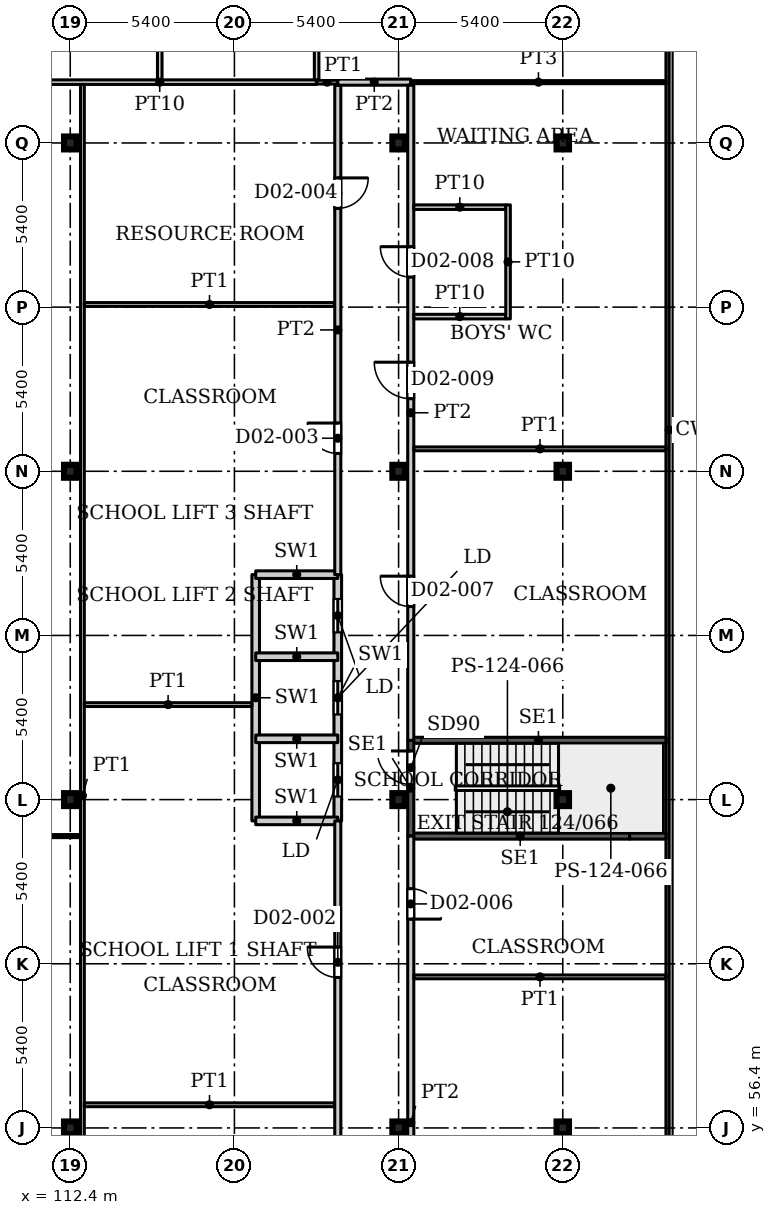
"""IFC4 building model, lengths in metres.
Left out: names, types, materials, properties, quantities, classifications, styles, units other than length and angle.
Written with IfcOpenShell. Run it as: python <this file> out.ifc"""

import sys

from ifc_helpers import new_model, si_unit, direction, frame, frame_2d, origin, origin_2d, place, context, subcontext, project, spatial, rectangle, i_section, extrude, source, transform, mapped, element, fill, save


model = new_model("IFC4")
c1 = context("Model", 3, precision=1e-05, world=origin(), true_north=direction((0.0, 1.0)))
c2 = subcontext(c1, "Body", "Model", "MODEL_VIEW")
j1 = project(units=[si_unit("LENGTHUNIT", "METRE"), si_unit("PLANEANGLEUNIT", "RADIAN")], contexts=[c1])
p1 = place(None, origin())
s1 = spatial("IfcSite", under=j1, at=p1, CompositionType="ELEMENT")
p2 = place(p1, origin())
s2 = spatial("IfcBuilding", under=s1, at=p2, CompositionType="ELEMENT")
p3 = place(p2, frame((0.0, 0.0, 12.5)))
s3 = spatial("IfcBuildingStorey", under=s2, at=p3, CompositionType="ELEMENT", Elevation=12.5)
for number, where, z_axis, x_axis in (
    (1, (112.4, 56.4, 0.0), (0.0, 0.0, 1.0), (1.0, 0.0, 0.0)),
    (2, (123.2, 56.4, 0.0), (0.0, 0.0, 1.0), (1.0, 0.0, 0.0)),
    (3, (128.6, 56.4, 0.0), (0.0, 0.0, 1.0), (1.0, 0.0, 0.0)),
    (4, (112.4, 67.2, 0.0), (0.0, 0.0, 1.0), (1.0, 0.0, 0.0)),
    (5, (123.2, 67.2, 0.0), (0.0, 0.0, 1.0), (1.0, 0.0, 0.0)),
    (6, (128.6, 67.2, 0.0), (0.0, 0.0, 1.0), (1.0, 0.0, 0.0)),
    (7, (112.4, 78.0, 0.0), (0.0, 0.0, 1.0), (1.0, 0.0, 0.0)),
    (8, (123.2, 78.0, 0.0), (0.0, 0.0, 1.0), (1.0, 0.0, 0.0)),
    (9, (128.6, 78.0, 0.0), (0.0, 0.0, 1.0), (1.0, 0.0, 0.0)),
    (10, (112.4, 88.8, 0.0), (0.0, 0.0, 1.0), (1.0, 0.0, 0.0)),
    (11, (123.2, 88.8, 0.0), (0.0, 0.0, 1.0), (1.0, 0.0, 0.0)),
    (12, (128.6, 88.8, 0.0), (0.0, 0.0, 1.0), (1.0, 0.0, 0.0)),
):
    element("IfcColumn", number, at=place(p3, frame(where, z_axis=z_axis, x_axis=x_axis)), inside=s3, PredefinedType="COLUMN", context=c2, shape_type="SweptSolid", body=[
        extrude(i_section(OverallWidth=0.409, OverallDepth=0.425, WebThickness=0.033, FlangeThickness=0.052, FilletRadius=0.013, at=origin_2d()), origin(), (0.0, 0.0, 1.0), 4.5),
    ])
p4 = place(p3, frame((118.5, 66.5, 0.0), z_axis=(0.0, 0.0, 1.0), x_axis=(0.0, 1.0, 0.0)))
e13 = element("IfcWall", 13, at=p4, inside=s3, PredefinedType="PARTITIONING", context=c2, shape_type="SweptSolid", body=[
    extrude(rectangle(XDim=8.1, YDim=0.25, at=frame_2d((4.05, 0.0))), origin(), (0.0, 0.0, 1.0), 4.5),
])
p5 = place(p3, frame((121.2, 66.5, 0.0), z_axis=(0.0, 0.0, 1.0), x_axis=(0.0, 1.0, 0.0)))
e14 = element("IfcWall", 14, at=p5, inside=s3, PredefinedType="PARTITIONING", context=c2, shape_type="SweptSolid", body=[
    extrude(rectangle(XDim=8.1, YDim=0.25, at=frame_2d((4.05, 0.0))), origin(), (0.0, 0.0, 1.0), 4.5),
])
p6 = place(p5, frame((0.8, 0.0, 0.0)))
e15 = element("IfcOpeningElement", 15, at=p6, cuts=e14, PredefinedType="OPENING", context=c2, shape_type="SweptSolid", body=[
    extrude(rectangle(XDim=1.1, YDim=2.2, at=frame_2d((0.55, 1.1))), frame((0.0, 0.135, 0.0), z_axis=(0.0, -1.0, 0.0), x_axis=(1.0, 0.0, 0.0)), (0.0, 0.0, 1.0), 0.27),
])
p7 = place(p5, frame((3.5, 0.0, 0.0)))
e16 = element("IfcOpeningElement", 16, at=p7, cuts=e14, PredefinedType="OPENING", context=c2, shape_type="SweptSolid", body=[
    extrude(rectangle(XDim=1.1, YDim=2.2, at=frame_2d((0.55, 1.1))), frame((0.0, 0.135, 0.0), z_axis=(0.0, -1.0, 0.0), x_axis=(1.0, 0.0, 0.0)), (0.0, 0.0, 1.0), 0.27),
])
p8 = place(p5, frame((6.2, 0.0, 0.0)))
e17 = element("IfcOpeningElement", 17, at=p8, cuts=e14, PredefinedType="OPENING", context=c2, shape_type="SweptSolid", body=[
    extrude(rectangle(XDim=1.1, YDim=2.2, at=frame_2d((0.55, 1.1))), frame((0.0, 0.135, 0.0), z_axis=(0.0, -1.0, 0.0), x_axis=(1.0, 0.0, 0.0)), (0.0, 0.0, 1.0), 0.27),
])
for number, where, z_axis, x_axis in (
    (18, (118.5, 66.5, 0.0), (0.0, 0.0, 1.0), (1.0, 0.0, 0.0)),
    (19, (118.5, 69.2, 0.0), (0.0, 0.0, 1.0), (1.0, 0.0, 0.0)),
    (20, (118.5, 71.9, 0.0), (0.0, 0.0, 1.0), (1.0, 0.0, 0.0)),
    (21, (118.5, 74.6, 0.0), (0.0, 0.0, 1.0), (1.0, 0.0, 0.0)),
):
    element("IfcWall", number, at=place(p3, frame(where, z_axis=z_axis, x_axis=x_axis)), inside=s3, PredefinedType="PARTITIONING", context=c2, shape_type="SweptSolid", body=[
        extrude(rectangle(XDim=2.7, YDim=0.25, at=frame_2d((1.35, 0.0))), origin(), (0.0, 0.0, 1.0), 4.5),
    ])
p9 = place(p3, frame((123.6, 66.0, 0.0), z_axis=(0.0, 0.0, 1.0), x_axis=(1.0, 0.0, 0.0)))
e22 = element("IfcWall", 22, at=p9, inside=s3, PredefinedType="SHEAR", context=c2, shape_type="SweptSolid", body=[
    extrude(rectangle(XDim=7.2, YDim=0.2, at=frame_2d((3.6, 0.0))), origin(), (0.0, 0.0, 1.0), 4.5),
])
p10 = place(p3, frame((130.8, 66.0, 0.0), z_axis=(0.0, 0.0, 1.0), x_axis=(1.0, 0.0, 0.0)))
e23 = element("IfcWall", 23, at=p10, inside=s3, PredefinedType="SHEAR", context=c2, shape_type="SweptSolid", body=[
    extrude(rectangle(XDim=1.2, YDim=0.2, at=frame_2d((0.6, 0.0))), origin(), (0.0, 0.0, 1.0), 4.5),
])
p11 = place(p3, frame((123.6, 69.15, 0.0), z_axis=(0.0, 0.0, 1.0), x_axis=(1.0, 0.0, 0.0)))
e24 = element("IfcWall", 24, at=p11, inside=s3, PredefinedType="SHEAR", context=c2, shape_type="SweptSolid", body=[
    extrude(rectangle(XDim=8.4, YDim=0.2, at=frame_2d((4.2, 0.0))), origin(), (0.0, 0.0, 1.0), 4.5),
])
p12 = place(p3, frame((123.6, 66.0, 0.0), z_axis=(0.0, 0.0, 1.0), x_axis=(0.0, 1.0, 0.0)))
e25 = element("IfcWall", 25, at=p12, inside=s3, PredefinedType="SHEAR", context=c2, shape_type="SweptSolid", body=[
    extrude(rectangle(XDim=3.15, YDim=0.2, at=frame_2d((1.575, 0.0))), origin(), (0.0, 0.0, 1.0), 4.5),
])
p13 = place(p12, frame((1.7, 0.0, 0.0)))
e26 = element("IfcOpeningElement", 26, at=p13, cuts=e25, PredefinedType="OPENING", context=c2, shape_type="SweptSolid", body=[
    extrude(rectangle(XDim=1.1, YDim=2.2, at=frame_2d((0.55, 1.1))), frame((0.0, 0.11, 0.0), z_axis=(0.0, -1.0, 0.0), x_axis=(1.0, 0.0, 0.0)), (0.0, 0.0, 1.0), 0.22),
])
p14 = place(p3, frame((92.7, 66.0, 0.0), z_axis=(0.0, 0.0, 1.0), x_axis=(1.0, 0.0, 0.0)))
e27 = element("IfcWall", 27, at=p14, inside=s3, PredefinedType="PARTITIONING", context=c2, shape_type="SweptSolid", body=[
    extrude(rectangle(XDim=20.038, YDim=0.1, at=frame_2d((10.019, 0.0))), origin(), (0.0, 0.0, 1.0), 4.18),
])
p15 = place(p3, frame((110.183, 90.8, 0.0), z_axis=(0.0, 0.0, 1.0), x_axis=(1.0, 0.0, 0.0)))
e28 = element("IfcWall", 28, at=p15, inside=s3, PredefinedType="PARTITIONING", context=c2, shape_type="SweptSolid", body=[
    extrude(rectangle(XDim=10.321, YDim=0.15, at=frame_2d((5.16, 0.0))), origin(), (0.0, 0.0, 1.0), 4.18),
])
p16 = place(p3, frame((112.8, 43.938, 0.0), z_axis=(0.0, 0.0, 1.0), x_axis=(0.0, 1.0, 0.0)))
e29 = element("IfcWall", 29, at=p16, inside=s3, PredefinedType="PARTITIONING", context=c2, shape_type="SweptSolid", body=[
    extrude(rectangle(XDim=46.787, YDim=0.125, at=frame_2d((23.394, 0.0))), origin(), (0.0, 0.0, 1.0), 4.18),
])
p17 = place(p3, frame((112.862, 57.162, 0.0), z_axis=(0.0, 0.0, 1.0), x_axis=(1.0, 0.0, 0.0)))
e30 = element("IfcWall", 30, at=p17, inside=s3, PredefinedType="PARTITIONING", context=c2, shape_type="SweptSolid", body=[
    extrude(rectangle(XDim=8.238, YDim=0.125, at=frame_2d((4.119, 0.0))), origin(), (0.0, 0.0, 1.0), 4.18),
])
p18 = place(p3, frame((112.862, 70.325, 0.0), z_axis=(0.0, 0.0, 1.0), x_axis=(1.0, 0.0, 0.0)))
e31 = element("IfcWall", 31, at=p18, inside=s3, PredefinedType="PARTITIONING", context=c2, shape_type="SweptSolid", body=[
    extrude(rectangle(XDim=5.514, YDim=0.125, at=frame_2d((2.757, 0.0))), origin(), (0.0, 0.0, 1.0), 4.18),
])
p19 = place(p3, frame((112.862, 83.487, 0.0), z_axis=(0.0, 0.0, 1.0), x_axis=(1.0, 0.0, 0.0)))
e32 = element("IfcWall", 32, at=p19, inside=s3, PredefinedType="PARTITIONING", context=c2, shape_type="SweptSolid", body=[
    extrude(rectangle(XDim=8.238, YDim=0.125, at=frame_2d((4.119, 0.0))), origin(), (0.0, 0.0, 1.0), 4.18),
])
p20 = place(p3, frame((115.344, 90.875, 0.0), z_axis=(0.0, 0.0, 1.0), x_axis=(0.0, 1.0, 0.0)))
e33 = element("IfcWall", 33, at=p20, inside=s3, PredefinedType="PARTITIONING", context=c2, shape_type="SweptSolid", body=[
    extrude(rectangle(XDim=8.225, YDim=0.15, at=frame_2d((4.113, 0.0))), origin(), (0.0, 0.0, 1.0), 4.18),
])
p21 = place(p3, frame((120.504, 90.8, 0.0), z_axis=(0.0, 0.0, 1.0), x_axis=(1.0, 0.0, 0.0)))
e34 = element("IfcWall", 34, at=p21, inside=s3, PredefinedType="PARTITIONING", context=c2, shape_type="SweptSolid", body=[
    extrude(rectangle(XDim=0.696, YDim=0.125, at=frame_2d((0.348, 0.0))), origin(), (0.0, 0.0, 1.0), 4.18),
])
p22 = place(p3, frame((120.504, 90.875, 0.0), z_axis=(0.0, 0.0, 1.0), x_axis=(0.0, 1.0, 0.0)))
e35 = element("IfcWall", 35, at=p22, inside=s3, PredefinedType="PARTITIONING", context=c2, shape_type="SweptSolid", body=[
    extrude(rectangle(XDim=8.225, YDim=0.15, at=frame_2d((4.113, 0.0))), origin(), (0.0, 0.0, 1.0), 4.18),
])
p23 = place(p3, frame((121.2, 43.9, 0.0), z_axis=(0.0, 0.0, 1.0), x_axis=(0.0, 1.0, 0.0)))
e36 = element("IfcWall", 36, at=p23, inside=s3, PredefinedType="PARTITIONING", context=c2, shape_type="SweptSolid", body=[
    extrude(rectangle(XDim=22.6, YDim=0.2, at=frame_2d((11.3, 0.0))), origin(), (0.0, 0.0, 1.0), 4.18),
])
p24 = place(p23, frame((6.112, 0.0, 0.0)))
e37 = element("IfcOpeningElement", 37, at=p24, cuts=e36, PredefinedType="OPENING", context=c2, shape_type="SweptSolid", body=[
    extrude(rectangle(XDim=1.0, YDim=2.1, at=frame_2d((0.5, 1.05))), frame((0.0, 0.11, 0.0), z_axis=(0.0, -1.0, 0.0), x_axis=(1.0, 0.0, 0.0)), (0.0, 0.0, 1.0), 0.22),
])
p25 = place(p23, frame((17.45, 0.0, 0.0)))
e38 = element("IfcOpeningElement", 38, at=p25, cuts=e36, PredefinedType="OPENING", context=c2, shape_type="SweptSolid", body=[
    extrude(rectangle(XDim=1.0, YDim=2.1, at=frame_2d((0.5, 1.05))), frame((0.0, 0.11, 0.0), z_axis=(0.0, -1.0, 0.0), x_axis=(1.0, 0.0, 0.0)), (0.0, 0.0, 1.0), 0.22),
])
p26 = place(p3, frame((121.2, 74.6, 0.0), z_axis=(0.0, 0.0, 1.0), x_axis=(0.0, 1.0, 0.0)))
e39 = element("IfcWall", 39, at=p26, inside=s3, PredefinedType="PARTITIONING", context=c2, shape_type="SweptSolid", body=[
    extrude(rectangle(XDim=16.1, YDim=0.2, at=frame_2d((8.05, 0.0))), origin(), (0.0, 0.0, 1.0), 4.18),
])
p27 = place(p26, frame((3.987, 0.0, 0.0)))
e40 = element("IfcOpeningElement", 40, at=p27, cuts=e39, PredefinedType="OPENING", context=c2, shape_type="SweptSolid", body=[
    extrude(rectangle(XDim=1.0, YDim=2.1, at=frame_2d((0.5, 1.05))), frame((0.0, 0.11, 0.0), z_axis=(0.0, -1.0, 0.0), x_axis=(1.0, 0.0, 0.0)), (0.0, 0.0, 1.0), 0.22),
])
p28 = place(p26, frame((12.05, 0.0, 0.0)))
e41 = element("IfcOpeningElement", 41, at=p28, cuts=e39, PredefinedType="OPENING", context=c2, shape_type="SweptSolid", body=[
    extrude(rectangle(XDim=1.0, YDim=2.1, at=frame_2d((0.5, 1.05))), frame((0.0, 0.11, 0.0), z_axis=(0.0, -1.0, 0.0), x_axis=(1.0, 0.0, 0.0)), (0.0, 0.0, 1.0), 0.22),
])
p29 = place(p3, frame((121.2, 90.8, 0.0), z_axis=(0.0, 0.0, 1.0), x_axis=(1.0, 0.0, 0.0)))
e42 = element("IfcWall", 42, at=p29, inside=s3, PredefinedType="PARTITIONING", context=c2, shape_type="SweptSolid", body=[
    extrude(rectangle(XDim=2.4, YDim=0.2, at=frame_2d((1.2, 0.0))), origin(), (0.0, 0.0, 1.0), 4.18),
])
p30 = place(p3, frame((123.6, 47.15, 0.0), z_axis=(0.0, 0.0, 1.0), x_axis=(0.0, 1.0, 0.0)))
e43 = element("IfcWall", 43, at=p30, inside=s3, PredefinedType="PARTITIONING", context=c2, shape_type="SweptSolid", body=[
    extrude(rectangle(XDim=18.85, YDim=0.2, at=frame_2d((9.425, 0.0))), origin(), (0.0, 0.0, 1.0), 4.18),
])
p31 = place(p30, frame((6.65, 0.0, 0.0)))
e44 = element("IfcOpeningElement", 44, at=p31, cuts=e43, PredefinedType="OPENING", context=c2, shape_type="SweptSolid", body=[
    extrude(rectangle(XDim=1.0, YDim=2.1, at=frame_2d((0.5, 1.05))), frame((0.0, 0.11, 0.0), z_axis=(0.0, -1.0, 0.0), x_axis=(1.0, 0.0, 0.0)), (0.0, 0.0, 1.0), 0.22),
])
p32 = place(p30, frame((16.119, 0.0, 0.0)))
e45 = element("IfcOpeningElement", 45, at=p32, cuts=e43, PredefinedType="OPENING", context=c2, shape_type="SweptSolid", body=[
    extrude(rectangle(XDim=1.0, YDim=2.1, at=frame_2d((0.5, 1.05))), frame((0.0, 0.11, 0.0), z_axis=(0.0, -1.0, 0.0), x_axis=(1.0, 0.0, 0.0)), (0.0, 0.0, 1.0), 0.22),
])
p33 = place(p3, frame((123.6, 69.15, 0.0), z_axis=(0.0, 0.0, 1.0), x_axis=(0.0, 1.0, 0.0)))
e46 = element("IfcWall", 46, at=p33, inside=s3, PredefinedType="PARTITIONING", context=c2, shape_type="SweptSolid", body=[
    extrude(rectangle(XDim=21.55, YDim=0.2, at=frame_2d((10.775, 0.0))), origin(), (0.0, 0.0, 1.0), 4.18),
])
p34 = place(p33, frame((4.4, 0.0, 0.0)))
e47 = element("IfcOpeningElement", 47, at=p34, cuts=e46, PredefinedType="OPENING", context=c2, shape_type="SweptSolid", body=[
    extrude(rectangle(XDim=1.0, YDim=2.1, at=frame_2d((0.5, 1.05))), frame((0.0, 0.11, 0.0), z_axis=(0.0, -1.0, 0.0), x_axis=(1.0, 0.0, 0.0)), (0.0, 0.0, 1.0), 0.22),
])
p35 = place(p33, frame((15.238, 0.0, 0.0)))
e48 = element("IfcOpeningElement", 48, at=p35, cuts=e46, PredefinedType="OPENING", context=c2, shape_type="SweptSolid", body=[
    extrude(rectangle(XDim=1.0, YDim=2.1, at=frame_2d((0.5, 1.05))), frame((0.0, 0.11, 0.0), z_axis=(0.0, -1.0, 0.0), x_axis=(1.0, 0.0, 0.0)), (0.0, 0.0, 1.0), 0.22),
])
p36 = place(p33, frame((11.238, 0.0, 0.0)))
e49 = element("IfcOpeningElement", 49, at=p36, cuts=e46, PredefinedType="OPENING", context=c2, shape_type="SweptSolid", body=[
    extrude(rectangle(XDim=1.2, YDim=2.1, at=frame_2d((0.6, 1.05))), frame((0.0, 0.11, 0.0), z_axis=(0.0, -1.0, 0.0), x_axis=(1.0, 0.0, 0.0)), (0.0, 0.0, 1.0), 0.22),
])
p37 = place(p3, frame((123.6, 90.8, 0.0), z_axis=(0.0, 0.0, 1.0), x_axis=(1.0, 0.0, 0.0)))
e50 = element("IfcWall", 50, at=p37, inside=s3, PredefinedType="PARTITIONING", context=c2, shape_type="SweptSolid", body=[
    extrude(rectangle(XDim=8.4, YDim=0.1, at=frame_2d((4.2, 0.0))), origin(), (0.0, 0.0, 1.0), 4.18),
])
for number, where, z_axis, x_axis in (
    (51, (123.7, 61.369, 0.0), (0.0, 0.0, 1.0), (1.0, 0.0, 0.0)),
    (52, (123.7, 78.738, 0.0), (0.0, 0.0, 1.0), (1.0, 0.0, 0.0)),
):
    element("IfcWall", number, at=place(p3, frame(where, z_axis=z_axis, x_axis=x_axis)), inside=s3, PredefinedType="PARTITIONING", context=c2, shape_type="SweptSolid", body=[
        extrude(rectangle(XDim=8.3, YDim=0.125, at=frame_2d((4.15, 0.0))), origin(), (0.0, 0.0, 1.0), 4.18),
    ])
for number, where, z_axis, x_axis in (
    (53, (123.7, 83.088, 0.0), (0.0, 0.0, 1.0), (1.0, 0.0, 0.0)),
    (54, (123.7, 86.688, 0.0), (0.0, 0.0, 1.0), (1.0, 0.0, 0.0)),
):
    element("IfcWall", number, at=place(p3, frame(where, z_axis=z_axis, x_axis=x_axis)), inside=s3, PredefinedType="PARTITIONING", context=c2, shape_type="SweptSolid", body=[
        extrude(rectangle(XDim=3.025, YDim=0.15, at=frame_2d((1.513, 0.0))), origin(), (0.0, 0.0, 1.0), 4.18),
    ])
p38 = place(p3, frame((126.8, 83.013, 0.0), z_axis=(0.0, 0.0, 1.0), x_axis=(0.0, 1.0, 0.0)))
e55 = element("IfcWall", 55, at=p38, inside=s3, PredefinedType="PARTITIONING", context=c2, shape_type="SweptSolid", body=[
    extrude(rectangle(XDim=3.75, YDim=0.15, at=frame_2d((1.875, 0.0))), origin(), (0.0, 0.0, 1.0), 4.18),
])
m1 = source(origin(), c2, "Body", "SweptSolid", [
    extrude(rectangle(XDim=1.1, YDim=2.2, at=frame_2d((0.55, 1.1))), frame((0.0, 0.025, 0.0), z_axis=(0.0, -1.0, 0.0), x_axis=(1.0, 0.0, 0.0)), (0.0, 0.0, 1.0), 0.05),
])
p39 = place(p6, origin())
e56 = element("IfcDoor", 56, at=p39, inside=s3, OperationType="SLIDING_TO_LEFT", PredefinedType="DOOR", context=c2, shape_type="MappedRepresentation", body=[
    mapped(m1, transform((0.0, 0.0, 0.0), x_axis=(1.0, 0.0, 0.0), y_axis=(0.0, 1.0, 0.0), z_axis=(0.0, 0.0, 1.0), scale=1.0)),
])
fill(e15, e56)
p40 = place(p7, origin())
e57 = element("IfcDoor", 57, at=p40, inside=s3, OperationType="SLIDING_TO_LEFT", PredefinedType="DOOR", context=c2, shape_type="MappedRepresentation", body=[
    mapped(m1, transform((0.0, 0.0, 0.0), x_axis=(1.0, 0.0, 0.0), y_axis=(0.0, 1.0, 0.0), z_axis=(0.0, 0.0, 1.0), scale=1.0)),
])
fill(e16, e57)
p41 = place(p8, origin())
e58 = element("IfcDoor", 58, at=p41, inside=s3, OperationType="SLIDING_TO_LEFT", PredefinedType="DOOR", context=c2, shape_type="MappedRepresentation", body=[
    mapped(m1, transform((0.0, 0.0, 0.0), x_axis=(1.0, 0.0, 0.0), y_axis=(0.0, 1.0, 0.0), z_axis=(0.0, 0.0, 1.0), scale=1.0)),
])
fill(e17, e58)
m2 = source(origin(), c2, "Body", "SweptSolid", [
    extrude(rectangle(XDim=1.1, YDim=2.2, at=frame_2d((0.55, 1.1))), frame((0.0, 0.025, 0.0), z_axis=(0.0, -1.0, 0.0), x_axis=(1.0, 0.0, 0.0)), (0.0, 0.0, 1.0), 0.05),
])
p42 = place(p13, origin())
e59 = element("IfcDoor", 59, at=p42, inside=s3, OperationType="SINGLE_SWING_LEFT", PredefinedType="DOOR", context=c2, shape_type="MappedRepresentation", body=[
    mapped(m2, transform((0.0, 0.0, 0.0), x_axis=(1.0, 0.0, 0.0), y_axis=(0.0, 1.0, 0.0), z_axis=(0.0, 0.0, 1.0), scale=1.0)),
])
fill(e26, e59)
m3 = source(origin(), c2, "Body", "SweptSolid", [
    extrude(rectangle(XDim=1.0, YDim=2.1, at=frame_2d((0.5, 1.05))), frame((0.0, 0.025, 0.0), z_axis=(0.0, -1.0, 0.0), x_axis=(1.0, 0.0, 0.0)), (0.0, 0.0, 1.0), 0.05),
])
p43 = place(p25, origin())
e60 = element("IfcDoor", 60, at=p43, inside=s3, OperationType="SINGLE_SWING_LEFT", PredefinedType="DOOR", context=c2, shape_type="MappedRepresentation", body=[
    mapped(m3, transform((0.0, 0.0, 0.0), x_axis=(1.0, 0.0, 0.0), y_axis=(0.0, 1.0, 0.0), z_axis=(0.0, 0.0, 1.0), scale=1.0)),
])
fill(e38, e60)
p44 = place(p27, origin())
e61 = element("IfcDoor", 61, at=p44, inside=s3, OperationType="SINGLE_SWING_LEFT", PredefinedType="DOOR", context=c2, shape_type="MappedRepresentation", body=[
    mapped(m3, transform((0.0, 0.0, 0.0), x_axis=(1.0, 0.0, 0.0), y_axis=(0.0, 1.0, 0.0), z_axis=(0.0, 0.0, 1.0), scale=1.0)),
])
fill(e40, e61)
p45 = place(p28, origin())
e62 = element("IfcDoor", 62, at=p45, inside=s3, OperationType="SINGLE_SWING_RIGHT", PredefinedType="DOOR", context=c2, shape_type="MappedRepresentation", body=[
    mapped(m3, transform((0.0, 0.0, 0.0), x_axis=(1.0, 0.0, 0.0), y_axis=(0.0, 1.0, 0.0), z_axis=(0.0, 0.0, 1.0), scale=1.0)),
])
fill(e41, e62)
p46 = place(p32, origin())
e63 = element("IfcDoor", 63, at=p46, inside=s3, OperationType="SINGLE_SWING_RIGHT", PredefinedType="DOOR", context=c2, shape_type="MappedRepresentation", body=[
    mapped(m3, transform((0.0, 0.0, 0.0), x_axis=(1.0, 0.0, 0.0), y_axis=(0.0, 1.0, 0.0), z_axis=(0.0, 0.0, 1.0), scale=1.0)),
])
fill(e45, e63)
p47 = place(p34, origin())
e64 = element("IfcDoor", 64, at=p47, inside=s3, OperationType="SINGLE_SWING_LEFT", PredefinedType="DOOR", context=c2, shape_type="MappedRepresentation", body=[
    mapped(m3, transform((0.0, 0.0, 0.0), x_axis=(1.0, 0.0, 0.0), y_axis=(0.0, 1.0, 0.0), z_axis=(0.0, 0.0, 1.0), scale=1.0)),
])
fill(e47, e64)
p48 = place(p35, origin())
e65 = element("IfcDoor", 65, at=p48, inside=s3, OperationType="SINGLE_SWING_LEFT", PredefinedType="DOOR", context=c2, shape_type="MappedRepresentation", body=[
    mapped(m3, transform((0.0, 0.0, 0.0), x_axis=(1.0, 0.0, 0.0), y_axis=(0.0, 1.0, 0.0), z_axis=(0.0, 0.0, 1.0), scale=1.0)),
])
fill(e48, e65)
m4 = source(origin(), c2, "Body", "SweptSolid", [
    extrude(rectangle(XDim=1.2, YDim=2.1, at=frame_2d((0.6, 1.05))), frame((0.0, 0.025, 0.0), z_axis=(0.0, -1.0, 0.0), x_axis=(1.0, 0.0, 0.0)), (0.0, 0.0, 1.0), 0.05),
])
p49 = place(p36, origin())
e66 = element("IfcDoor", 66, at=p49, inside=s3, OperationType="SINGLE_SWING_LEFT", PredefinedType="DOOR", context=c2, shape_type="MappedRepresentation", body=[
    mapped(m4, transform((0.0, 0.0, 0.0), x_axis=(1.0, 0.0, 0.0), y_axis=(0.0, 1.0, 0.0), z_axis=(0.0, 0.0, 1.0), scale=1.0)),
])
fill(e49, e66)
save(model, sys.argv[1])
